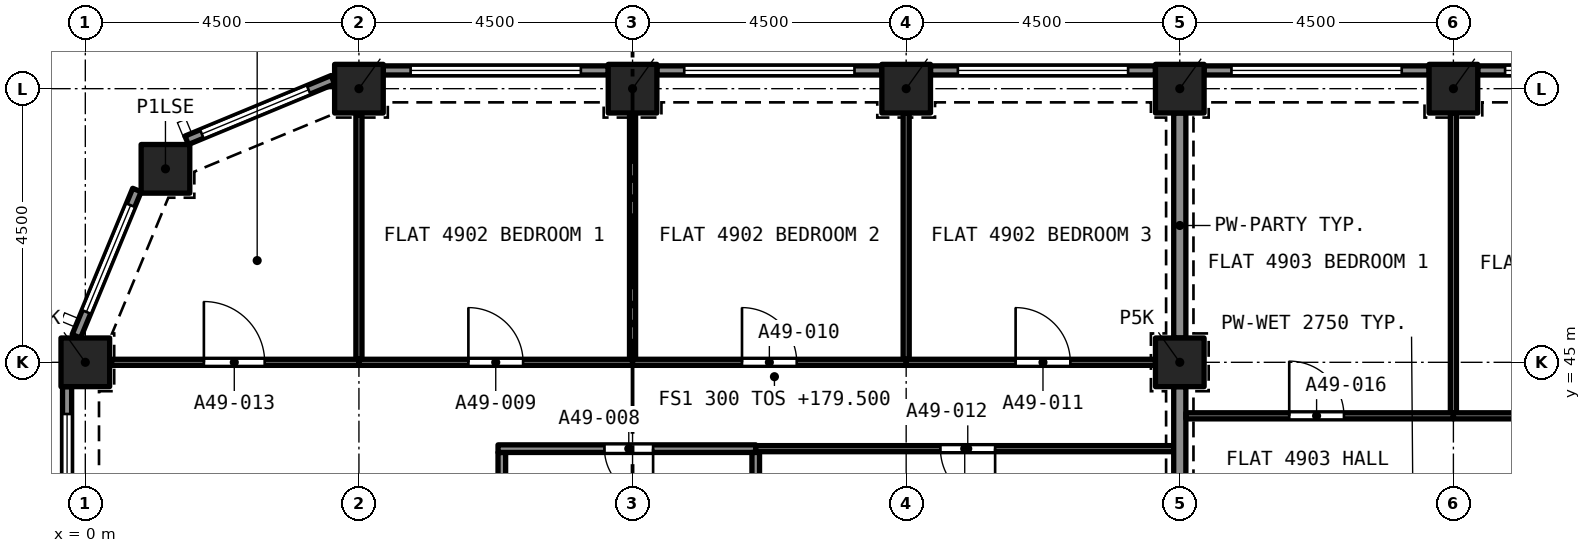
"""IFC4 building model, lengths in metres.
Left out: names, types, materials, properties, quantities, classifications, styles, units other than length and angle.
Written with IfcOpenShell. Run it as: python <this file> out.ifc"""

import sys

from ifc_helpers import new_model, si_unit, direction, frame, frame_2d, origin, origin_2d, place, context, subcontext, project, spatial, rectangle, extrude, element, fill, save


model = new_model("IFC4")
c1 = context("Model", 3, precision=1e-05, world=origin(), true_north=direction((0.0, 1.0)))
c2 = subcontext(c1, "Body", "Model", "MODEL_VIEW")
j1 = project(units=[si_unit("LENGTHUNIT", "METRE"), si_unit("PLANEANGLEUNIT", "RADIAN")], contexts=[c1])
p1 = place(None, origin())
s1 = spatial("IfcSite", under=j1, at=p1, CompositionType="ELEMENT")
p2 = place(p1, origin())
s2 = spatial("IfcBuilding", under=s1, at=p2, CompositionType="ELEMENT")
p3 = place(p2, frame((0.0, 0.0, 179.5)))
s3 = spatial("IfcBuildingStorey", under=s2, at=p3, CompositionType="ELEMENT", Elevation=179.5)
for number, where, z_axis, x_axis in (
    (1, (0.0, 45.0, 0.0), (0.0, 0.0, 1.0), (1.0, 0.0, 0.0)),
    (2, (18.0, 45.0, 0.0), (0.0, 0.0, 1.0), (1.0, 0.0, 0.0)),
    (3, (1.318, 48.182, 0.0), (0.0, 0.0, 1.0), (1.0, 0.0, 0.0)),
    (4, (4.5, 49.5, 0.0), (0.0, 0.0, 1.0), (1.0, 0.0, 0.0)),
    (5, (9.0, 49.5, 0.0), (0.0, 0.0, 1.0), (1.0, 0.0, 0.0)),
    (6, (13.5, 49.5, 0.0), (0.0, 0.0, 1.0), (1.0, 0.0, 0.0)),
    (7, (18.0, 49.5, 0.0), (0.0, 0.0, 1.0), (1.0, 0.0, 0.0)),
    (8, (22.5, 49.5, 0.0), (0.0, 0.0, 1.0), (1.0, 0.0, 0.0)),
):
    element("IfcColumn", number, at=place(p3, frame(where, z_axis=z_axis, x_axis=x_axis)), inside=s3, PredefinedType="COLUMN", context=c2, shape_type="SweptSolid", body=[
        extrude(rectangle(XDim=0.8, YDim=0.8, at=origin_2d()), origin(), (0.0, 0.0, 1.0), 3.2),
    ])
p4 = place(p3, frame((22.9, 49.8, 0.0), z_axis=(0.0, 0.0, 1.0), x_axis=(1.0, 0.0, 0.0)))
e9 = element("IfcWall", 9, at=p4, inside=s3, PredefinedType="SOLIDWALL", context=c2, shape_type="SweptSolid", body=[
    extrude(rectangle(XDim=3.7, YDim=0.15, at=frame_2d((1.85, 0.0))), origin(), (0.0, 0.0, 1.0), 3.2),
])
p5 = place(p4, frame((0.45, 0.0, 0.45)))
e10 = element("IfcOpeningElement", 10, at=p5, cuts=e9, PredefinedType="OPENING", context=c2, shape_type="SweptSolid", body=[
    extrude(rectangle(XDim=2.8, YDim=1.95, at=frame_2d((1.4, 0.975))), frame((0.0, 0.085, 0.0), z_axis=(0.0, -1.0, 0.0), x_axis=(1.0, 0.0, 0.0)), (0.0, 0.0, 1.0), 0.17),
])
p6 = place(p3, frame((18.4, 49.8, 0.0), z_axis=(0.0, 0.0, 1.0), x_axis=(1.0, 0.0, 0.0)))
e11 = element("IfcWall", 11, at=p6, inside=s3, PredefinedType="SOLIDWALL", context=c2, shape_type="SweptSolid", body=[
    extrude(rectangle(XDim=3.7, YDim=0.15, at=frame_2d((1.85, 0.0))), origin(), (0.0, 0.0, 1.0), 3.2),
])
p7 = place(p6, frame((0.45, 0.0, 0.45)))
e12 = element("IfcOpeningElement", 12, at=p7, cuts=e11, PredefinedType="OPENING", context=c2, shape_type="SweptSolid", body=[
    extrude(rectangle(XDim=2.8, YDim=1.95, at=frame_2d((1.4, 0.975))), frame((0.0, 0.085, 0.0), z_axis=(0.0, -1.0, 0.0), x_axis=(1.0, 0.0, 0.0)), (0.0, 0.0, 1.0), 0.17),
])
p8 = place(p3, frame((13.9, 49.8, 0.0), z_axis=(0.0, 0.0, 1.0), x_axis=(1.0, 0.0, 0.0)))
e13 = element("IfcWall", 13, at=p8, inside=s3, PredefinedType="SOLIDWALL", context=c2, shape_type="SweptSolid", body=[
    extrude(rectangle(XDim=3.7, YDim=0.15, at=frame_2d((1.85, 0.0))), origin(), (0.0, 0.0, 1.0), 3.2),
])
p9 = place(p8, frame((0.45, 0.0, 0.45)))
e14 = element("IfcOpeningElement", 14, at=p9, cuts=e13, PredefinedType="OPENING", context=c2, shape_type="SweptSolid", body=[
    extrude(rectangle(XDim=2.8, YDim=1.95, at=frame_2d((1.4, 0.975))), frame((0.0, 0.085, 0.0), z_axis=(0.0, -1.0, 0.0), x_axis=(1.0, 0.0, 0.0)), (0.0, 0.0, 1.0), 0.17),
])
p10 = place(p3, frame((9.4, 49.8, 0.0), z_axis=(0.0, 0.0, 1.0), x_axis=(1.0, 0.0, 0.0)))
e15 = element("IfcWall", 15, at=p10, inside=s3, PredefinedType="SOLIDWALL", context=c2, shape_type="SweptSolid", body=[
    extrude(rectangle(XDim=3.7, YDim=0.15, at=frame_2d((1.85, 0.0))), origin(), (0.0, 0.0, 1.0), 3.2),
])
p11 = place(p10, frame((0.45, 0.0, 0.45)))
e16 = element("IfcOpeningElement", 16, at=p11, cuts=e15, PredefinedType="OPENING", context=c2, shape_type="SweptSolid", body=[
    extrude(rectangle(XDim=2.8, YDim=1.95, at=frame_2d((1.4, 0.975))), frame((0.0, 0.085, 0.0), z_axis=(0.0, -1.0, 0.0), x_axis=(1.0, 0.0, 0.0)), (0.0, 0.0, 1.0), 0.17),
])
p12 = place(p3, frame((4.9, 49.8, 0.0), z_axis=(0.0, 0.0, 1.0), x_axis=(1.0, 0.0, 0.0)))
e17 = element("IfcWall", 17, at=p12, inside=s3, PredefinedType="SOLIDWALL", context=c2, shape_type="SweptSolid", body=[
    extrude(rectangle(XDim=3.7, YDim=0.15, at=frame_2d((1.85, 0.0))), origin(), (0.0, 0.0, 1.0), 3.2),
])
p13 = place(p12, frame((0.45, 0.0, 0.45)))
e18 = element("IfcOpeningElement", 18, at=p13, cuts=e17, PredefinedType="OPENING", context=c2, shape_type="SweptSolid", body=[
    extrude(rectangle(XDim=2.8, YDim=1.95, at=frame_2d((1.4, 0.975))), frame((0.0, 0.085, 0.0), z_axis=(0.0, -1.0, 0.0), x_axis=(1.0, 0.0, 0.0)), (0.0, 0.0, 1.0), 0.17),
])
p14 = place(p3, frame((1.667, 48.651, 0.0), z_axis=(0.0, 0.0, 1.0), x_axis=(0.923885342263, 0.382669406082, 0.0)))
e19 = element("IfcWall", 19, at=p14, inside=s3, PredefinedType="SOLIDWALL", context=c2, shape_type="SweptSolid", body=[
    extrude(rectangle(XDim=2.602, YDim=0.15, at=frame_2d((1.301, 0.0))), origin(), (0.0, 0.0, 1.0), 3.2),
])
p15 = place(p14, frame((0.27, 0.0, 0.45)))
e20 = element("IfcOpeningElement", 20, at=p15, cuts=e19, PredefinedType="OPENING", context=c2, shape_type="SweptSolid", body=[
    extrude(rectangle(XDim=1.9, YDim=1.95, at=frame_2d((0.95, 0.975))), frame((0.0, 0.085, 0.0), z_axis=(0.0, -1.0, 0.0), x_axis=(1.0, 0.0, 0.0)), (0.0, 0.0, 1.0), 0.17),
])
p16 = place(p3, frame((-0.147, 45.429, 0.0), z_axis=(0.0, 0.0, 1.0), x_axis=(0.382669406082, 0.923885342263, 0.0)))
e21 = element("IfcWall", 21, at=p16, inside=s3, PredefinedType="SOLIDWALL", context=c2, shape_type="SweptSolid", body=[
    extrude(rectangle(XDim=2.602, YDim=0.15, at=frame_2d((1.301, 0.0))), origin(), (0.0, 0.0, 1.0), 3.2),
])
p17 = place(p16, frame((0.432, 0.0, 0.45)))
e22 = element("IfcOpeningElement", 22, at=p17, cuts=e21, PredefinedType="OPENING", context=c2, shape_type="SweptSolid", body=[
    extrude(rectangle(XDim=1.9, YDim=1.95, at=frame_2d((0.95, 0.975))), frame((0.0, 0.085, 0.0), z_axis=(0.0, -1.0, 0.0), x_axis=(1.0, 0.0, 0.0)), (0.0, 0.0, 1.0), 0.17),
])
p18 = place(p3, frame((-0.3, 40.9, 0.0), z_axis=(0.0, 0.0, 1.0), x_axis=(0.0, 1.0, 0.0)))
e23 = element("IfcWall", 23, at=p18, inside=s3, PredefinedType="SOLIDWALL", context=c2, shape_type="SweptSolid", body=[
    extrude(rectangle(XDim=3.7, YDim=0.15, at=frame_2d((1.85, 0.0))), origin(), (0.0, 0.0, 1.0), 3.2),
])
p19 = place(p18, frame((0.45, 0.0, 0.45)))
e24 = element("IfcOpeningElement", 24, at=p19, cuts=e23, PredefinedType="OPENING", context=c2, shape_type="SweptSolid", body=[
    extrude(rectangle(XDim=2.8, YDim=1.95, at=frame_2d((1.4, 0.975))), frame((0.0, 0.085, 0.0), z_axis=(0.0, -1.0, 0.0), x_axis=(1.0, 0.0, 0.0)), (0.0, 0.0, 1.0), 0.17),
])
p20 = place(p3, frame((6.85, 40.15, 0.0), z_axis=(0.0, 0.0, 1.0), x_axis=(0.0, 1.0, 0.0)))
e25 = element("IfcWall", 25, at=p20, inside=s3, PredefinedType="PARTITIONING", context=c2, shape_type="SweptSolid", body=[
    extrude(rectangle(XDim=3.368, YDim=0.125, at=frame_2d((1.684, 0.0))), origin(), (0.0, 0.0, 1.0), 2.9),
])
p21 = place(p3, frame((11.026, 43.58, 0.0), z_axis=(0.0, 0.0, 1.0), x_axis=(-1.0, 0.0, 0.0)))
e26 = element("IfcWall", 26, at=p21, inside=s3, PredefinedType="PARTITIONING", context=c2, shape_type="SweptSolid", body=[
    extrude(rectangle(XDim=4.239, YDim=0.125, at=frame_2d((2.119, 0.0))), origin(), (0.0, 0.0, 1.0), 2.9),
])
p22 = place(p21, frame((1.688, 0.0, 0.0)))
e27 = element("IfcOpeningElement", 27, at=p22, cuts=e26, PredefinedType="OPENING", context=c2, shape_type="SweptSolid", body=[
    extrude(rectangle(XDim=0.8, YDim=2.1, at=frame_2d((0.4, 1.05))), frame((0.0, 0.073, 0.0), z_axis=(0.0, -1.0, 0.0), x_axis=(1.0, 0.0, 0.0)), (0.0, 0.0, 1.0), 0.145),
])
p23 = place(p3, frame((11.026, 40.15, 0.0), z_axis=(0.0, 0.0, 1.0), x_axis=(0.0, 1.0, 0.0)))
e28 = element("IfcWall", 28, at=p23, inside=s3, PredefinedType="PARTITIONING", context=c2, shape_type="SweptSolid", body=[
    extrude(rectangle(XDim=3.368, YDim=0.125, at=frame_2d((1.684, 0.0))), origin(), (0.0, 0.0, 1.0), 2.9),
])
p24 = place(p3, frame((9.0, 45.05, 0.0), z_axis=(0.0, 0.0, 1.0), x_axis=(0.0, 1.0, 0.0)))
e29 = element("IfcWall", 29, at=p24, inside=s3, PredefinedType="PARTITIONING", context=c2, shape_type="SweptSolid", body=[
    extrude(rectangle(XDim=4.05, YDim=0.1, at=frame_2d((2.025, 0.0))), origin(), (0.0, 0.0, 1.0), 2.9),
])
p25 = place(p3, frame((4.5, 45.0, 0.0), z_axis=(0.0, 0.0, 1.0), x_axis=(1.0, 0.0, 0.0)))
e30 = element("IfcWall", 30, at=p25, inside=s3, PredefinedType="PARTITIONING", context=c2, shape_type="SweptSolid", body=[
    extrude(rectangle(XDim=4.5, YDim=0.1, at=frame_2d((2.25, 0.0))), origin(), (0.0, 0.0, 1.0), 2.9),
])
p26 = place(p25, frame((1.8, 0.0, 0.0)))
e31 = element("IfcOpeningElement", 31, at=p26, cuts=e30, PredefinedType="OPENING", context=c2, shape_type="SweptSolid", body=[
    extrude(rectangle(XDim=0.9, YDim=2.1, at=frame_2d((0.45, 1.05))), frame((0.0, 0.06, 0.0), z_axis=(0.0, -1.0, 0.0), x_axis=(1.0, 0.0, 0.0)), (0.0, 0.0, 1.0), 0.12),
])
p27 = place(p3, frame((4.5, 45.05, 0.0), z_axis=(0.0, 0.0, 1.0), x_axis=(0.0, 1.0, 0.0)))
e32 = element("IfcWall", 32, at=p27, inside=s3, PredefinedType="PARTITIONING", context=c2, shape_type="SweptSolid", body=[
    extrude(rectangle(XDim=4.017, YDim=0.1, at=frame_2d((2.009, 0.0))), origin(), (0.0, 0.0, 1.0), 2.9),
])
p28 = place(p3, frame((13.5, 45.05, 0.0), z_axis=(0.0, 0.0, 1.0), x_axis=(0.0, 1.0, 0.0)))
e33 = element("IfcWall", 33, at=p28, inside=s3, PredefinedType="PARTITIONING", context=c2, shape_type="SweptSolid", body=[
    extrude(rectangle(XDim=4.05, YDim=0.1, at=frame_2d((2.025, 0.0))), origin(), (0.0, 0.0, 1.0), 2.9),
])
p29 = place(p3, frame((9.0, 45.0, 0.0), z_axis=(0.0, 0.0, 1.0), x_axis=(1.0, 0.0, 0.0)))
e34 = element("IfcWall", 34, at=p29, inside=s3, PredefinedType="PARTITIONING", context=c2, shape_type="SweptSolid", body=[
    extrude(rectangle(XDim=4.5, YDim=0.1, at=frame_2d((2.25, 0.0))), origin(), (0.0, 0.0, 1.0), 2.9),
])
p30 = place(p29, frame((1.8, 0.0, 0.0)))
e35 = element("IfcOpeningElement", 35, at=p30, cuts=e34, PredefinedType="OPENING", context=c2, shape_type="SweptSolid", body=[
    extrude(rectangle(XDim=0.9, YDim=2.1, at=frame_2d((0.45, 1.05))), frame((0.0, 0.06, 0.0), z_axis=(0.0, -1.0, 0.0), x_axis=(1.0, 0.0, 0.0)), (0.0, 0.0, 1.0), 0.12),
])
p31 = place(p3, frame((13.5, 45.0, 0.0), z_axis=(0.0, 0.0, 1.0), x_axis=(1.0, 0.0, 0.0)))
e36 = element("IfcWall", 36, at=p31, inside=s3, PredefinedType="PARTITIONING", context=c2, shape_type="SweptSolid", body=[
    extrude(rectangle(XDim=4.1, YDim=0.1, at=frame_2d((2.05, 0.0))), origin(), (0.0, 0.0, 1.0), 2.9),
])
p32 = place(p31, frame((1.8, 0.0, 0.0)))
e37 = element("IfcOpeningElement", 37, at=p32, cuts=e36, PredefinedType="OPENING", context=c2, shape_type="SweptSolid", body=[
    extrude(rectangle(XDim=0.9, YDim=2.1, at=frame_2d((0.45, 1.05))), frame((0.0, 0.06, 0.0), z_axis=(0.0, -1.0, 0.0), x_axis=(1.0, 0.0, 0.0)), (0.0, 0.0, 1.0), 0.12),
])
p33 = place(p3, frame((18.0, 45.4, 0.0), z_axis=(0.0, 0.0, 1.0), x_axis=(0.0, 1.0, 0.0)))
e38 = element("IfcWall", 38, at=p33, inside=s3, PredefinedType="PARTITIONING", context=c2, shape_type="SweptSolid", body=[
    extrude(rectangle(XDim=3.7, YDim=0.2, at=frame_2d((1.85, 0.0))), origin(), (0.0, 0.0, 1.0), 2.38),
])
p34 = place(p3, frame((17.9, 43.58, 0.0), z_axis=(0.0, 0.0, 1.0), x_axis=(-1.0, 0.0, 0.0)))
e39 = element("IfcWall", 39, at=p34, inside=s3, PredefinedType="PARTITIONING", context=c2, shape_type="SweptSolid", body=[
    extrude(rectangle(XDim=6.874, YDim=0.1, at=frame_2d((3.437, 0.0))), origin(), (0.0, 0.0, 1.0), 2.9),
])
p35 = place(p34, frame((2.937, 0.0, 0.0)))
e40 = element("IfcOpeningElement", 40, at=p35, cuts=e39, PredefinedType="OPENING", context=c2, shape_type="SweptSolid", body=[
    extrude(rectangle(XDim=0.9, YDim=2.1, at=frame_2d((0.45, 1.05))), frame((0.0, 0.06, 0.0), z_axis=(0.0, -1.0, 0.0), x_axis=(1.0, 0.0, 0.0)), (0.0, 0.0, 1.0), 0.12),
])
p36 = place(p3, frame((0.433, 45.0, 0.0), z_axis=(0.0, 0.0, 1.0), x_axis=(1.0, 0.0, 0.0)))
e41 = element("IfcWall", 41, at=p36, inside=s3, PredefinedType="PARTITIONING", context=c2, shape_type="SweptSolid", body=[
    extrude(rectangle(XDim=4.067, YDim=0.1, at=frame_2d((2.034, 0.0))), origin(), (0.0, 0.0, 1.0), 2.9),
])
p37 = place(p36, frame((1.517, 0.0, 0.0)))
e42 = element("IfcOpeningElement", 42, at=p37, cuts=e41, PredefinedType="OPENING", context=c2, shape_type="SweptSolid", body=[
    extrude(rectangle(XDim=1.0, YDim=2.1, at=frame_2d((0.5, 1.05))), frame((0.0, 0.06, 0.0), z_axis=(0.0, -1.0, 0.0), x_axis=(1.0, 0.0, 0.0)), (0.0, 0.0, 1.0), 0.12),
])
p38 = place(p3, frame((18.0, 40.9, 0.0), z_axis=(0.0, 0.0, 1.0), x_axis=(0.0, 1.0, 0.0)))
e43 = element("IfcWall", 43, at=p38, inside=s3, PredefinedType="PARTITIONING", context=c2, shape_type="SweptSolid", body=[
    extrude(rectangle(XDim=3.7, YDim=0.2, at=frame_2d((1.85, 0.0))), origin(), (0.0, 0.0, 1.0), 2.38),
])
p39 = place(p3, frame((22.5, 44.17, 0.0), z_axis=(0.0, 0.0, 1.0), x_axis=(0.0, 1.0, 0.0)))
e44 = element("IfcWall", 44, at=p39, inside=s3, PredefinedType="PARTITIONING", context=c2, shape_type="SweptSolid", body=[
    extrude(rectangle(XDim=4.93, YDim=0.1, at=frame_2d((2.465, 0.0))), origin(), (0.0, 0.0, 1.0), 2.75),
])
p40 = place(p3, frame((18.1, 44.12, 0.0), z_axis=(0.0, 0.0, 1.0), x_axis=(1.0, 0.0, 0.0)))
e45 = element("IfcWall", 45, at=p40, inside=s3, PredefinedType="PARTITIONING", context=c2, shape_type="SweptSolid", body=[
    extrude(rectangle(XDim=4.4, YDim=0.1, at=frame_2d((2.2, 0.0))), origin(), (0.0, 0.0, 1.0), 2.75),
])
p41 = place(p40, frame((1.7, 0.0, 0.0)))
e46 = element("IfcOpeningElement", 46, at=p41, cuts=e45, PredefinedType="OPENING", context=c2, shape_type="SweptSolid", body=[
    extrude(rectangle(XDim=0.9, YDim=2.1, at=frame_2d((0.45, 1.05))), frame((0.0, 0.06, 0.0), z_axis=(0.0, -1.0, 0.0), x_axis=(1.0, 0.0, 0.0)), (0.0, 0.0, 1.0), 0.12),
])
p42 = place(p3, frame((22.5, 44.12, 0.0), z_axis=(0.0, 0.0, 1.0), x_axis=(1.0, 0.0, 0.0)))
e47 = element("IfcWall", 47, at=p42, inside=s3, PredefinedType="PARTITIONING", context=c2, shape_type="SweptSolid", body=[
    extrude(rectangle(XDim=4.45, YDim=0.1, at=frame_2d((2.225, 0.0))), origin(), (0.0, 0.0, 1.0), 2.75),
])
p43 = place(p42, frame((1.8, 0.0, 0.0)))
e48 = element("IfcOpeningElement", 48, at=p43, cuts=e47, PredefinedType="OPENING", context=c2, shape_type="SweptSolid", body=[
    extrude(rectangle(XDim=0.9, YDim=2.1, at=frame_2d((0.45, 1.05))), frame((0.0, 0.06, 0.0), z_axis=(0.0, -1.0, 0.0), x_axis=(1.0, 0.0, 0.0)), (0.0, 0.0, 1.0), 0.12),
])
p44 = place(p5, origin())
e49 = element("IfcWindow", 49, at=p44, inside=s3, PartitioningType="SINGLE_PANEL", PredefinedType="WINDOW", context=c2, shape_type="SweptSolid", body=[
    extrude(rectangle(XDim=2.8, YDim=1.95, at=frame_2d((1.4, 0.975))), frame((0.0, 0.03, 0.0), z_axis=(0.0, -1.0, 0.0), x_axis=(1.0, 0.0, 0.0)), (0.0, 0.0, 1.0), 0.06),
])
fill(e10, e49)
p45 = place(p7, origin())
e50 = element("IfcWindow", 50, at=p45, inside=s3, PartitioningType="SINGLE_PANEL", PredefinedType="WINDOW", context=c2, shape_type="SweptSolid", body=[
    extrude(rectangle(XDim=2.8, YDim=1.95, at=frame_2d((1.4, 0.975))), frame((0.0, 0.03, 0.0), z_axis=(0.0, -1.0, 0.0), x_axis=(1.0, 0.0, 0.0)), (0.0, 0.0, 1.0), 0.06),
])
fill(e12, e50)
p46 = place(p9, origin())
e51 = element("IfcWindow", 51, at=p46, inside=s3, PartitioningType="SINGLE_PANEL", PredefinedType="WINDOW", context=c2, shape_type="SweptSolid", body=[
    extrude(rectangle(XDim=2.8, YDim=1.95, at=frame_2d((1.4, 0.975))), frame((0.0, 0.03, 0.0), z_axis=(0.0, -1.0, 0.0), x_axis=(1.0, 0.0, 0.0)), (0.0, 0.0, 1.0), 0.06),
])
fill(e14, e51)
p47 = place(p11, origin())
e52 = element("IfcWindow", 52, at=p47, inside=s3, PartitioningType="SINGLE_PANEL", PredefinedType="WINDOW", context=c2, shape_type="SweptSolid", body=[
    extrude(rectangle(XDim=2.8, YDim=1.95, at=frame_2d((1.4, 0.975))), frame((0.0, 0.03, 0.0), z_axis=(0.0, -1.0, 0.0), x_axis=(1.0, 0.0, 0.0)), (0.0, 0.0, 1.0), 0.06),
])
fill(e16, e52)
p48 = place(p13, origin())
e53 = element("IfcWindow", 53, at=p48, inside=s3, PartitioningType="SINGLE_PANEL", PredefinedType="WINDOW", context=c2, shape_type="SweptSolid", body=[
    extrude(rectangle(XDim=2.8, YDim=1.95, at=frame_2d((1.4, 0.975))), frame((0.0, 0.03, 0.0), z_axis=(0.0, -1.0, 0.0), x_axis=(1.0, 0.0, 0.0)), (0.0, 0.0, 1.0), 0.06),
])
fill(e18, e53)
p49 = place(p15, origin())
e54 = element("IfcWindow", 54, at=p49, inside=s3, PartitioningType="SINGLE_PANEL", PredefinedType="WINDOW", context=c2, shape_type="SweptSolid", body=[
    extrude(rectangle(XDim=1.9, YDim=1.95, at=frame_2d((0.95, 0.975))), frame((0.0, 0.03, 0.0), z_axis=(0.0, -1.0, 0.0), x_axis=(1.0, 0.0, 0.0)), (0.0, 0.0, 1.0), 0.06),
])
fill(e20, e54)
p50 = place(p17, origin())
e55 = element("IfcWindow", 55, at=p50, inside=s3, PartitioningType="SINGLE_PANEL", PredefinedType="WINDOW", context=c2, shape_type="SweptSolid", body=[
    extrude(rectangle(XDim=1.9, YDim=1.95, at=frame_2d((0.95, 0.975))), frame((0.0, 0.03, 0.0), z_axis=(0.0, -1.0, 0.0), x_axis=(1.0, 0.0, 0.0)), (0.0, 0.0, 1.0), 0.06),
])
fill(e22, e55)
p51 = place(p19, origin())
e56 = element("IfcWindow", 56, at=p51, inside=s3, PartitioningType="SINGLE_PANEL", PredefinedType="WINDOW", context=c2, shape_type="SweptSolid", body=[
    extrude(rectangle(XDim=2.8, YDim=1.95, at=frame_2d((1.4, 0.975))), frame((0.0, 0.03, 0.0), z_axis=(0.0, -1.0, 0.0), x_axis=(1.0, 0.0, 0.0)), (0.0, 0.0, 1.0), 0.06),
])
fill(e24, e56)
p52 = place(p22, origin())
e57 = element("IfcDoor", 57, at=p52, inside=s3, OperationType="SINGLE_SWING_LEFT", PredefinedType="DOOR", context=c2, shape_type="SweptSolid", body=[
    extrude(rectangle(XDim=0.8, YDim=2.1, at=frame_2d((0.4, 1.05))), frame((0.0, 0.025, 0.0), z_axis=(0.0, -1.0, 0.0), x_axis=(1.0, 0.0, 0.0)), (0.0, 0.0, 1.0), 0.05),
])
fill(e27, e57)
p53 = place(p26, origin())
e58 = element("IfcDoor", 58, at=p53, inside=s3, OperationType="SINGLE_SWING_LEFT", PredefinedType="DOOR", context=c2, shape_type="SweptSolid", body=[
    extrude(rectangle(XDim=0.9, YDim=2.1, at=frame_2d((0.45, 1.05))), frame((0.0, 0.025, 0.0), z_axis=(0.0, -1.0, 0.0), x_axis=(1.0, 0.0, 0.0)), (0.0, 0.0, 1.0), 0.05),
])
fill(e31, e58)
p54 = place(p30, origin())
e59 = element("IfcDoor", 59, at=p54, inside=s3, OperationType="SINGLE_SWING_LEFT", PredefinedType="DOOR", context=c2, shape_type="SweptSolid", body=[
    extrude(rectangle(XDim=0.9, YDim=2.1, at=frame_2d((0.45, 1.05))), frame((0.0, 0.025, 0.0), z_axis=(0.0, -1.0, 0.0), x_axis=(1.0, 0.0, 0.0)), (0.0, 0.0, 1.0), 0.05),
])
fill(e35, e59)
p55 = place(p32, origin())
e60 = element("IfcDoor", 60, at=p55, inside=s3, OperationType="SINGLE_SWING_RIGHT", PredefinedType="DOOR", context=c2, shape_type="SweptSolid", body=[
    extrude(rectangle(XDim=0.9, YDim=2.1, at=frame_2d((0.45, 1.05))), frame((0.0, 0.025, 0.0), z_axis=(0.0, -1.0, 0.0), x_axis=(1.0, 0.0, 0.0)), (0.0, 0.0, 1.0), 0.05),
])
fill(e37, e60)
p56 = place(p35, origin())
e61 = element("IfcDoor", 61, at=p56, inside=s3, OperationType="SINGLE_SWING_LEFT", PredefinedType="DOOR", context=c2, shape_type="SweptSolid", body=[
    extrude(rectangle(XDim=0.9, YDim=2.1, at=frame_2d((0.45, 1.05))), frame((0.0, 0.025, 0.0), z_axis=(0.0, -1.0, 0.0), x_axis=(1.0, 0.0, 0.0)), (0.0, 0.0, 1.0), 0.05),
])
fill(e40, e61)
p57 = place(p37, origin())
e62 = element("IfcDoor", 62, at=p57, inside=s3, OperationType="SINGLE_SWING_LEFT", PredefinedType="DOOR", context=c2, shape_type="SweptSolid", body=[
    extrude(rectangle(XDim=1.0, YDim=2.1, at=frame_2d((0.5, 1.05))), frame((0.0, 0.025, 0.0), z_axis=(0.0, -1.0, 0.0), x_axis=(1.0, 0.0, 0.0)), (0.0, 0.0, 1.0), 0.05),
])
fill(e42, e62)
p58 = place(p41, origin())
e63 = element("IfcDoor", 63, at=p58, inside=s3, OperationType="SINGLE_SWING_LEFT", PredefinedType="DOOR", context=c2, shape_type="SweptSolid", body=[
    extrude(rectangle(XDim=0.9, YDim=2.1, at=frame_2d((0.45, 1.05))), frame((0.0, 0.025, 0.0), z_axis=(0.0, -1.0, 0.0), x_axis=(1.0, 0.0, 0.0)), (0.0, 0.0, 1.0), 0.05),
])
fill(e46, e63)
save(model, sys.argv[1])
